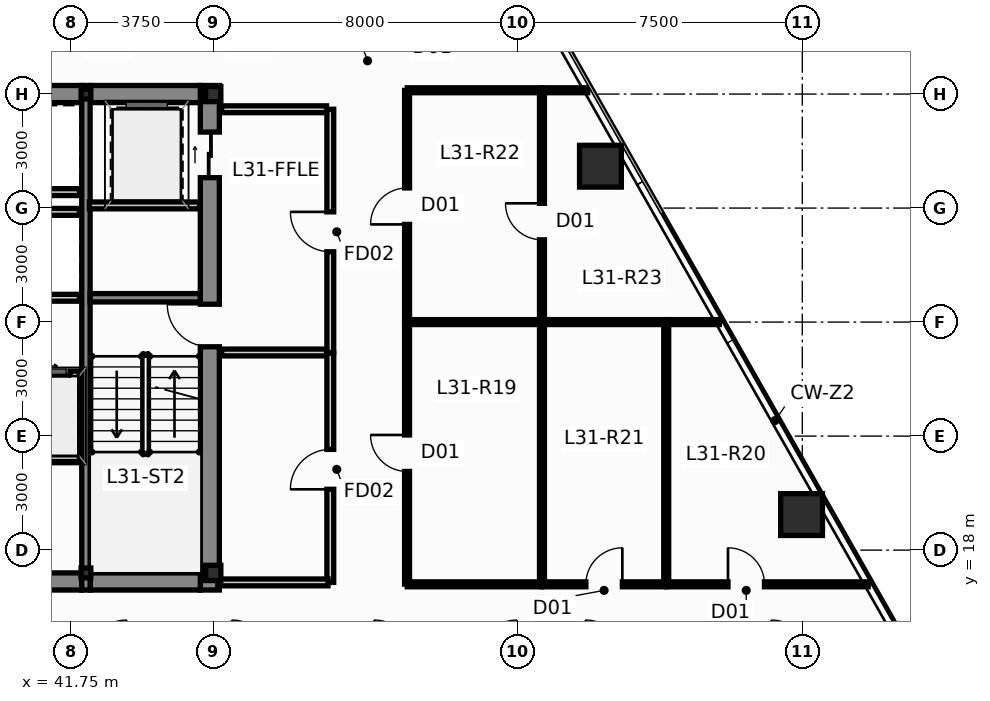
"""IFC4 building model, lengths in metres.
Left out: names, types, materials, properties, quantities, classifications, styles, units other than length and angle.
Written with IfcOpenShell. Run it as: python <this file> out.ifc"""

import sys

from ifc_helpers import new_model, si_unit, direction, frame, frame_2d, origin, origin_2d, place, context, subcontext, project, spatial, rectangle, hollow_rectangle, i_section, extrude, source, transform, mapped, element, fill, save


model = new_model("IFC4")
c1 = context("Model", 3, precision=1e-05, world=origin(), true_north=direction((0.0, 1.0)))
c2 = subcontext(c1, "Body", "Model", "MODEL_VIEW")
j1 = project(units=[si_unit("LENGTHUNIT", "METRE"), si_unit("PLANEANGLEUNIT", "RADIAN")], contexts=[c1])
p1 = place(None, origin())
s1 = spatial("IfcSite", under=j1, at=p1, CompositionType="ELEMENT")
p2 = place(p1, origin())
s2 = spatial("IfcBuilding", under=s1, at=p2, CompositionType="ELEMENT")
p3 = place(p2, frame((0.0, 0.0, 120.0)))
s3 = spatial("IfcBuildingStorey", under=s2, at=p3, CompositionType="ELEMENT", Elevation=120.0)
m1 = source(origin(), c2, "Body", "SweptSolid", [
    extrude(i_section(OverallWidth=0.4, OverallDepth=0.4, WebThickness=0.02, FlangeThickness=0.032, at=origin_2d()), origin(), (0.0, 0.0, 1.0), 3.65),
])
for number, where, z_axis, x_axis in (
    (1, (45.5, 17.4, 0.0), (0.0, 0.0, 1.0), (1.0, 0.0, 0.0)),
    (2, (45.5, 30.0, 0.0), (0.0, 0.0, 1.0), (1.0, 0.0, 0.0)),
):
    element("IfcColumn", number, at=place(p3, frame(where, z_axis=z_axis, x_axis=x_axis)), inside=s3, PredefinedType="COLUMN", context=c2, shape_type="MappedRepresentation", body=[
        mapped(m1, transform((0.0, 0.0, 0.0), scale=1.0)),
    ])
m2 = source(origin(), c2, "Body", "SweptSolid", [
    extrude(i_section(OverallWidth=0.256, OverallDepth=0.26, WebThickness=0.01, FlangeThickness=0.017, at=origin_2d()), origin(), (0.0, 0.0, 1.0), 3.65),
])
for number, where, z_axis, x_axis in (
    (3, (42.15, 17.4, 0.0), (0.0, 0.0, 1.0), (1.0, 0.0, 0.0)),
    (4, (42.15, 30.0, 0.0), (0.0, 0.0, 1.0), (1.0, 0.0, 0.0)),
):
    element("IfcColumn", number, at=place(p3, frame(where, z_axis=z_axis, x_axis=x_axis)), inside=s3, PredefinedType="COLUMN", context=c2, shape_type="MappedRepresentation", body=[
        mapped(m2, transform((0.0, 0.0, 0.0), scale=1.0)),
    ])
p4 = place(p3, frame((45.41, 16.95, 0.0), z_axis=(0.0, 0.0, 1.0), x_axis=(0.0, 1.0, 0.0)))
e5 = element("IfcWall", 5, at=p4, inside=s3, PredefinedType="SHEAR", context=c2, shape_type="SweptSolid", body=[
    extrude(rectangle(XDim=13.275, YDim=0.5, at=frame_2d((6.638, 0.0))), origin(), (0.0, 0.0, 1.0), 3.65),
])
p5 = place(p4, frame((6.4, 0.0, 0.0)))
e6 = element("IfcOpeningElement", 6, at=p5, cuts=e5, PredefinedType="OPENING", context=c2, shape_type="SweptSolid", body=[
    extrude(rectangle(XDim=1.12, YDim=2.15, at=frame_2d((0.56, 1.075))), frame((0.0, 0.262, 0.0), z_axis=(0.0, -1.0, 0.0), x_axis=(1.0, 0.0, 0.0)), (0.0, 0.0, 1.0), 0.524),
])
p6 = place(p4, frame((10.85, 0.0, 0.0)))
e7 = element("IfcOpeningElement", 7, at=p6, cuts=e5, PredefinedType="OPENING", context=c2, shape_type="SweptSolid", body=[
    extrude(rectangle(XDim=1.2, YDim=2.2, at=frame_2d((0.6, 1.1))), frame((0.0, 0.262, 0.0), z_axis=(0.0, -1.0, 0.0), x_axis=(1.0, 0.0, 0.0)), (0.0, 0.0, 1.0), 0.524),
])
p7 = place(p3, frame((33.96, 17.175, 0.0), z_axis=(0.0, 0.0, 1.0), x_axis=(1.0, 0.0, 0.0)))
e8 = element("IfcWall", 8, at=p7, inside=s3, PredefinedType="SHEAR", context=c2, shape_type="SweptSolid", body=[
    extrude(rectangle(XDim=8.08, YDim=0.45, at=frame_2d((4.04, 0.0))), origin(), (0.0, 0.0, 1.0), 3.65),
])
p8 = place(p3, frame((42.26, 17.175, 0.0), z_axis=(0.0, 0.0, 1.0), x_axis=(1.0, 0.0, 0.0)))
e9 = element("IfcWall", 9, at=p8, inside=s3, PredefinedType="SHEAR", context=c2, shape_type="SweptSolid", body=[
    extrude(rectangle(XDim=2.9, YDim=0.45, at=frame_2d((1.45, 0.0))), origin(), (0.0, 0.0, 1.0), 3.65),
])
p9 = place(p3, frame((40.16, 30.0, 0.0), z_axis=(0.0, 0.0, 1.0), x_axis=(1.0, 0.0, 0.0)))
e10 = element("IfcWall", 10, at=p9, inside=s3, PredefinedType="SHEAR", context=c2, shape_type="SweptSolid", body=[
    extrude(rectangle(XDim=1.88, YDim=0.45, at=frame_2d((0.94, 0.0))), origin(), (0.0, 0.0, 1.0), 3.65),
])
p10 = place(p3, frame((42.26, 30.0, 0.0), z_axis=(0.0, 0.0, 1.0), x_axis=(1.0, 0.0, 0.0)))
e11 = element("IfcWall", 11, at=p10, inside=s3, PredefinedType="SHEAR", context=c2, shape_type="SweptSolid", body=[
    extrude(rectangle(XDim=2.9, YDim=0.45, at=frame_2d((1.45, 0.0))), origin(), (0.0, 0.0, 1.0), 3.65),
])
p11 = place(p3, frame((42.15, 16.95, 0.0), z_axis=(0.0, 0.0, 1.0), x_axis=(0.0, 1.0, 0.0)))
e12 = element("IfcWall", 12, at=p11, inside=s3, PredefinedType="SHEAR", context=c2, shape_type="SweptSolid", body=[
    extrude(rectangle(XDim=13.275, YDim=0.22, at=frame_2d((6.638, 0.0))), origin(), (0.0, 0.0, 1.0), 3.65),
])
p12 = place(p3, frame((42.26, 24.64, 0.0), z_axis=(0.0, 0.0, 1.0), x_axis=(1.0, 0.0, 0.0)))
e13 = element("IfcWall", 13, at=p12, inside=s3, PredefinedType="SHEAR", context=c2, shape_type="SweptSolid", body=[
    extrude(rectangle(XDim=2.9, YDim=0.22, at=frame_2d((1.45, 0.0))), origin(), (0.0, 0.0, 1.0), 3.65),
])
m3 = source(origin(), c2, "Body", "SweptSolid", [
    extrude(hollow_rectangle(XDim=1.1, YDim=1.1, WallThickness=0.06, at=origin_2d()), origin(), (0.0, 0.0, 1.0), 3.651),
])
p13 = place(p3, frame((60.981, 18.935, 0.0), z_axis=(-0.010431780378, -0.021599135014, 0.999712286273), x_axis=(0.900476348161, -0.434904985489, 0.0)))
e14 = element("IfcColumn", 14, at=p13, inside=s3, PredefinedType="COLUMN", context=c2, shape_type="MappedRepresentation", body=[
    mapped(m3, transform((0.0, 0.0, 0.0), scale=1.0)),
])
m4 = source(origin(), c2, "Body", "SweptSolid", [
    extrude(hollow_rectangle(XDim=1.1, YDim=1.1, WallThickness=0.06, at=origin_2d()), origin(), (0.0, 0.0, 1.0), 3.651),
])
p14 = place(p3, frame((55.689, 28.102, 0.0), z_axis=(-0.014846438617, -0.013843300873, 0.999793951913), x_axis=(0.681966025159, -0.731383853069, 0.0)))
e15 = element("IfcColumn", 15, at=p14, inside=s3, PredefinedType="COLUMN", context=c2, shape_type="MappedRepresentation", body=[
    mapped(m4, transform((0.0, 0.0, 0.0), scale=1.0)),
])
p15 = place(p3, frame((40.28, 22.62, 0.0), z_axis=(0.0, 0.0, 1.0), x_axis=(1.0, 0.0, 0.0)))
e16 = element("IfcWall", 16, at=p15, inside=s3, PredefinedType="PARTITIONING", context=c2, shape_type="SweptSolid", body=[
    extrude(rectangle(XDim=1.7, YDim=0.18, at=frame_2d((0.85, 0.0))), origin(), (0.0, 0.0, 1.0), 3.4),
])
p16 = place(p15, frame((0.35, 0.0, 0.0)))
e17 = element("IfcOpeningElement", 17, at=p16, cuts=e16, PredefinedType="OPENING", context=c2, shape_type="SweptSolid", body=[
    extrude(rectangle(XDim=1.1, YDim=2.2, at=frame_2d((0.55, 1.1))), frame((0.0, 0.102, 0.0), z_axis=(0.0, -1.0, 0.0), x_axis=(1.0, 0.0, 0.0)), (0.0, 0.0, 1.0), 0.204),
])
p17 = place(p3, frame((40.28, 26.9, 0.0), z_axis=(0.0, 0.0, 1.0), x_axis=(1.0, 0.0, 0.0)))
e18 = element("IfcWall", 18, at=p17, inside=s3, PredefinedType="PARTITIONING", context=c2, shape_type="SweptSolid", body=[
    extrude(rectangle(XDim=1.7, YDim=0.18, at=frame_2d((0.85, 0.0))), origin(), (0.0, 0.0, 1.0), 3.4),
])
p18 = place(p3, frame((40.2, 24.64, 0.0), z_axis=(0.0, 0.0, 1.0), x_axis=(1.0, 0.0, 0.0)))
e19 = element("IfcWall", 19, at=p18, inside=s3, PredefinedType="PARTITIONING", context=c2, shape_type="SweptSolid", body=[
    extrude(rectangle(XDim=1.78, YDim=0.18, at=frame_2d((0.89, 0.0))), origin(), (0.0, 0.0, 1.0), 3.4),
])
p19 = place(p3, frame((40.22, 27.42, 0.0), z_axis=(0.0, 0.0, 1.0), x_axis=(1.0, 0.0, 0.0)))
e20 = element("IfcWall", 20, at=p19, inside=s3, PredefinedType="PARTITIONING", context=c2, shape_type="SweptSolid", body=[
    extrude(rectangle(XDim=1.76, YDim=0.18, at=frame_2d((0.88, 0.0))), origin(), (0.0, 0.0, 1.0), 3.4),
])
p20 = place(p3, frame((48.58, 23.2, 0.0), z_axis=(0.0, 0.0, 1.0), x_axis=(0.0, 1.0, 0.0)))
e21 = element("IfcWall", 21, at=p20, inside=s3, PredefinedType="PARTITIONING", context=c2, shape_type="SweptSolid", body=[
    extrude(rectangle(XDim=6.4, YDim=0.18, at=frame_2d((3.2, 0.0))), origin(), (0.0, 0.0, 1.0), 3.026),
])
p21 = place(p20, frame((2.65, 0.0, 0.0)))
e22 = element("IfcOpeningElement", 22, at=p21, cuts=e21, PredefinedType="OPENING", context=c2, shape_type="SweptSolid", body=[
    extrude(rectangle(XDim=1.05, YDim=2.15, at=frame_2d((0.525, 1.075))), frame((0.0, 0.102, 0.0), z_axis=(0.0, -1.0, 0.0), x_axis=(1.0, 0.0, 0.0)), (0.0, 0.0, 1.0), 0.204),
])
p22 = place(p3, frame((45.72, 23.2, 0.0), z_axis=(0.0, 0.0, 1.0), x_axis=(1.0, 0.0, 0.0)))
e23 = element("IfcWall", 23, at=p22, inside=s3, PredefinedType="PARTITIONING", context=c2, shape_type="SweptSolid", body=[
    extrude(rectangle(XDim=2.76, YDim=0.18, at=frame_2d((1.38, 0.0))), origin(), (0.0, 0.0, 1.0), 3.4),
])
p23 = place(p3, frame((45.72, 29.6, 0.0), z_axis=(0.0, 0.0, 1.0), x_axis=(1.0, 0.0, 0.0)))
e24 = element("IfcWall", 24, at=p23, inside=s3, PredefinedType="PARTITIONING", context=c2, shape_type="SweptSolid", body=[
    extrude(rectangle(XDim=2.76, YDim=0.18, at=frame_2d((1.38, 0.0))), origin(), (0.0, 0.0, 1.0), 2.783),
])
p24 = place(p3, frame((42.24, 27.07, 0.0), z_axis=(0.0, 0.0, 1.0), x_axis=(1.0, 0.0, 0.0)))
e25 = element("IfcWall", 25, at=p24, inside=s3, PredefinedType="PARTITIONING", context=c2, shape_type="SweptSolid", body=[
    extrude(rectangle(XDim=2.9, YDim=0.18, at=frame_2d((1.45, 0.0))), origin(), (0.0, 0.0, 1.0), 3.4),
])
p25 = place(p3, frame((40.22, 20.42, 0.0), z_axis=(0.0, 0.0, 1.0), x_axis=(1.0, 0.0, 0.0)))
e26 = element("IfcWall", 26, at=p25, inside=s3, PredefinedType="PARTITIONING", context=c2, shape_type="SweptSolid", body=[
    extrude(rectangle(XDim=1.76, YDim=0.18, at=frame_2d((0.88, 0.0))), origin(), (0.0, 0.0, 1.0), 3.4),
])
p26 = place(p3, frame((48.58, 17.15, 0.0), z_axis=(0.0, 0.0, 1.0), x_axis=(0.0, 1.0, 0.0)))
e27 = element("IfcWall", 27, at=p26, inside=s3, PredefinedType="PARTITIONING", context=c2, shape_type="SweptSolid", body=[
    extrude(rectangle(XDim=6.03, YDim=0.18, at=frame_2d((3.015, 0.0))), origin(), (0.0, 0.0, 1.0), 3.4),
])
p27 = place(p26, frame((2.45, 0.0, 0.0)))
e28 = element("IfcOpeningElement", 28, at=p27, cuts=e27, PredefinedType="OPENING", context=c2, shape_type="SweptSolid", body=[
    extrude(rectangle(XDim=1.05, YDim=2.15, at=frame_2d((0.525, 1.075))), frame((0.0, 0.102, 0.0), z_axis=(0.0, -1.0, 0.0), x_axis=(1.0, 0.0, 0.0)), (0.0, 0.0, 1.0), 0.204),
])
p28 = place(p3, frame((45.62, 17.15, 0.0), z_axis=(0.0, 0.0, 1.0), x_axis=(1.0, 0.0, 0.0)))
e29 = element("IfcWall", 29, at=p28, inside=s3, PredefinedType="PARTITIONING", context=c2, shape_type="SweptSolid", body=[
    extrude(rectangle(XDim=2.9, YDim=0.18, at=frame_2d((1.45, 0.0))), origin(), (0.0, 0.0, 1.0), 2.783),
])
p29 = place(p3, frame((50.6, 17.105, 0.0), z_axis=(0.0, 0.0, 1.0), x_axis=(0.0, 1.0, 0.0)))
e30 = element("IfcWall", 30, at=p29, inside=s3, PredefinedType="PARTITIONING", context=c2, shape_type="SweptSolid", body=[
    extrude(rectangle(XDim=6.89, YDim=0.13, at=frame_2d((3.445, 0.0))), origin(), (0.0, 0.0, 1.0), 3.026),
])
p30 = place(p29, frame((2.965, 0.0, 0.0)))
e31 = element("IfcOpeningElement", 31, at=p30, cuts=e30, PredefinedType="OPENING", context=c2, shape_type="SweptSolid", body=[
    extrude(rectangle(XDim=0.96, YDim=2.15, at=frame_2d((0.48, 1.075))), frame((0.0, 0.077, 0.0), z_axis=(0.0, -1.0, 0.0), x_axis=(1.0, 0.0, 0.0)), (0.0, 0.0, 1.0), 0.154),
])
p31 = place(p3, frame((54.15, 17.105, 0.0), z_axis=(0.0, 0.0, 1.0), x_axis=(0.0, 1.0, 0.0)))
e32 = element("IfcWall", 32, at=p31, inside=s3, PredefinedType="PARTITIONING", context=c2, shape_type="SweptSolid", body=[
    extrude(rectangle(XDim=6.89, YDim=0.13, at=frame_2d((3.445, 0.0))), origin(), (0.0, 0.0, 1.0), 3.026),
])
p32 = place(p3, frame((57.42, 17.105, 0.0), z_axis=(0.0, 0.0, 1.0), x_axis=(0.0, 1.0, 0.0)))
e33 = element("IfcWall", 33, at=p32, inside=s3, PredefinedType="PARTITIONING", context=c2, shape_type="SweptSolid", body=[
    extrude(rectangle(XDim=6.89, YDim=0.13, at=frame_2d((3.445, 0.0))), origin(), (0.0, 0.0, 1.0), 3.4),
])
p33 = place(p3, frame((50.6, 24.005, 0.0), z_axis=(0.0, 0.0, 1.0), x_axis=(0.0, 1.0, 0.0)))
e34 = element("IfcWall", 34, at=p33, inside=s3, PredefinedType="PARTITIONING", context=c2, shape_type="SweptSolid", body=[
    extrude(rectangle(XDim=6.09, YDim=0.13, at=frame_2d((3.045, 0.0))), origin(), (0.0, 0.0, 1.0), 3.026),
])
p34 = place(p33, frame((2.565, 0.0, 0.0)))
e35 = element("IfcOpeningElement", 35, at=p34, cuts=e34, PredefinedType="OPENING", context=c2, shape_type="SweptSolid", body=[
    extrude(rectangle(XDim=0.96, YDim=2.15, at=frame_2d((0.48, 1.075))), frame((0.0, 0.077, 0.0), z_axis=(0.0, -1.0, 0.0), x_axis=(1.0, 0.0, 0.0)), (0.0, 0.0, 1.0), 0.154),
])
p35 = place(p3, frame((54.15, 24.005, 0.0), z_axis=(0.0, 0.0, 1.0), x_axis=(0.0, 1.0, 0.0)))
e36 = element("IfcWall", 36, at=p35, inside=s3, PredefinedType="PARTITIONING", context=c2, shape_type="SweptSolid", body=[
    extrude(rectangle(XDim=6.09, YDim=0.13, at=frame_2d((3.045, 0.0))), origin(), (0.0, 0.0, 1.0), 3.026),
])
p36 = place(p35, frame((2.16, 0.0, 0.0)))
e37 = element("IfcOpeningElement", 37, at=p36, cuts=e36, PredefinedType="OPENING", context=c2, shape_type="SweptSolid", body=[
    extrude(rectangle(XDim=0.96, YDim=2.15, at=frame_2d((0.48, 1.075))), frame((0.0, 0.077, 0.0), z_axis=(0.0, -1.0, 0.0), x_axis=(1.0, 0.0, 0.0)), (0.0, 0.0, 1.0), 0.154),
])
p37 = place(p3, frame((57.425, 17.1, 0.0), z_axis=(0.0, 0.0, 1.0), x_axis=(1.0, 0.0, 0.0)))
e38 = element("IfcWall", 38, at=p37, inside=s3, PredefinedType="PARTITIONING", context=c2, shape_type="SweptSolid", body=[
    extrude(rectangle(XDim=5.309, YDim=0.13, at=frame_2d((2.654, 0.0))), origin(), (0.0, 0.0, 1.0), 3.4),
])
p38 = place(p37, frame((1.62, 0.0, 0.0)))
e39 = element("IfcOpeningElement", 39, at=p38, cuts=e38, PredefinedType="OPENING", context=c2, shape_type="SweptSolid", body=[
    extrude(rectangle(XDim=0.96, YDim=2.15, at=frame_2d((0.48, 1.075))), frame((0.0, 0.077, 0.0), z_axis=(0.0, -1.0, 0.0), x_axis=(1.0, 0.0, 0.0)), (0.0, 0.0, 1.0), 0.154),
])
for number, where, z_axis, x_axis in (
    (40, (50.605, 30.1, 0.0), (0.0, 0.0, 1.0), (1.0, 0.0, 0.0)),
    (41, (54.145, 17.1, 0.0), (0.0, 0.0, 1.0), (-1.0, 0.0, 0.0)),
    (42, (50.605, 24.0, 0.0), (0.0, 0.0, 1.0), (1.0, 0.0, 0.0)),
):
    element("IfcWall", number, at=place(p3, frame(where, z_axis=z_axis, x_axis=x_axis)), inside=s3, PredefinedType="PARTITIONING", context=c2, shape_type="SweptSolid", body=[
        extrude(rectangle(XDim=3.54, YDim=0.13, at=frame_2d((1.77, 0.0))), origin(), (0.0, 0.0, 1.0), 3.4),
    ])
p39 = place(p3, frame((54.155, 17.1, 0.0), z_axis=(0.0, 0.0, 1.0), x_axis=(1.0, 0.0, 0.0)))
e43 = element("IfcWall", 43, at=p39, inside=s3, PredefinedType="PARTITIONING", context=c2, shape_type="SweptSolid", body=[
    extrude(rectangle(XDim=3.26, YDim=0.13, at=frame_2d((1.63, 0.0))), origin(), (0.0, 0.0, 1.0), 3.4),
])
p40 = place(p39, frame((1.15, 0.0, 0.0)))
e44 = element("IfcOpeningElement", 44, at=p40, cuts=e43, PredefinedType="OPENING", context=c2, shape_type="SweptSolid", body=[
    extrude(rectangle(XDim=0.96, YDim=2.15, at=frame_2d((0.48, 1.075))), frame((0.0, 0.077, 0.0), z_axis=(0.0, -1.0, 0.0), x_axis=(1.0, 0.0, 0.0)), (0.0, 0.0, 1.0), 0.154),
])
p41 = place(p3, frame((54.155, 24.0, 0.0), z_axis=(0.0, 0.0, 1.0), x_axis=(1.0, 0.0, 0.0)))
e45 = element("IfcWall", 45, at=p41, inside=s3, PredefinedType="PARTITIONING", context=c2, shape_type="SweptSolid", body=[
    extrude(rectangle(XDim=3.26, YDim=0.13, at=frame_2d((1.63, 0.0))), origin(), (0.0, 0.0, 1.0), 3.4),
])
p42 = place(p3, frame((57.425, 24.0, 0.0), z_axis=(0.0, 0.0, 1.0), x_axis=(1.0, 0.0, 0.0)))
e46 = element("IfcWall", 46, at=p42, inside=s3, PredefinedType="PARTITIONING", context=c2, shape_type="SweptSolid", body=[
    extrude(rectangle(XDim=1.391, YDim=0.13, at=frame_2d((0.696, 0.0))), origin(), (0.0, 0.0, 1.0), 3.4),
])
p43 = place(p3, frame((54.155, 30.1, 0.0), z_axis=(0.0, 0.0, 1.0), x_axis=(1.0, 0.0, 0.0)))
e47 = element("IfcWall", 47, at=p43, inside=s3, PredefinedType="PARTITIONING", context=c2, shape_type="SweptSolid", body=[
    extrude(rectangle(XDim=1.198, YDim=0.13, at=frame_2d((0.599, 0.0))), origin(), (0.0, 0.0, 1.0), 3.4),
])
p44 = place(p5, origin())
e48 = element("IfcDoor", 48, at=p44, inside=s3, OperationType="SINGLE_SWING_RIGHT", PredefinedType="DOOR", context=c2, shape_type="SweptSolid", body=[
    extrude(rectangle(XDim=1.12, YDim=2.15, at=frame_2d((0.56, 1.075))), frame((0.0, 0.025, 0.0), z_axis=(0.0, -1.0, 0.0), x_axis=(1.0, 0.0, 0.0)), (0.0, 0.0, 1.0), 0.05),
])
fill(e6, e48)
p45 = place(p6, origin())
e49 = element("IfcDoor", 49, at=p45, inside=s3, OperationType="SLIDING_TO_RIGHT", PredefinedType="DOOR", context=c2, shape_type="SweptSolid", body=[
    extrude(rectangle(XDim=1.2, YDim=2.2, at=frame_2d((0.6, 1.1))), frame((0.0, 0.025, 0.0), z_axis=(0.0, -1.0, 0.0), x_axis=(1.0, 0.0, 0.0)), (0.0, 0.0, 1.0), 0.05),
])
fill(e7, e49)
p46 = place(p16, origin())
e50 = element("IfcDoor", 50, at=p46, inside=s3, OperationType="SLIDING_TO_LEFT", PredefinedType="DOOR", context=c2, shape_type="SweptSolid", body=[
    extrude(rectangle(XDim=1.1, YDim=2.2, at=frame_2d((0.55, 1.1))), frame((0.0, 0.025, 0.0), z_axis=(0.0, -1.0, 0.0), x_axis=(1.0, 0.0, 0.0)), (0.0, 0.0, 1.0), 0.05),
])
fill(e17, e50)
p47 = place(p21, origin())
e51 = element("IfcDoor", 51, at=p47, inside=s3, OperationType="SINGLE_SWING_RIGHT", PredefinedType="DOOR", context=c2, shape_type="SweptSolid", body=[
    extrude(rectangle(XDim=1.05, YDim=2.15, at=frame_2d((0.525, 1.075))), frame((0.0, 0.025, 0.0), z_axis=(0.0, -1.0, 0.0), x_axis=(1.0, 0.0, 0.0)), (0.0, 0.0, 1.0), 0.05),
])
fill(e22, e51)
p48 = place(p27, origin())
e52 = element("IfcDoor", 52, at=p48, inside=s3, OperationType="SINGLE_SWING_LEFT", PredefinedType="DOOR", context=c2, shape_type="SweptSolid", body=[
    extrude(rectangle(XDim=1.05, YDim=2.15, at=frame_2d((0.525, 1.075))), frame((0.0, 0.025, 0.0), z_axis=(0.0, -1.0, 0.0), x_axis=(1.0, 0.0, 0.0)), (0.0, 0.0, 1.0), 0.05),
])
fill(e28, e52)
p49 = place(p30, origin())
e53 = element("IfcDoor", 53, at=p49, inside=s3, OperationType="SINGLE_SWING_RIGHT", PredefinedType="DOOR", context=c2, shape_type="SweptSolid", body=[
    extrude(rectangle(XDim=0.96, YDim=2.15, at=frame_2d((0.48, 1.075))), frame((0.0, 0.025, 0.0), z_axis=(0.0, -1.0, 0.0), x_axis=(1.0, 0.0, 0.0)), (0.0, 0.0, 1.0), 0.05),
])
fill(e31, e53)
p50 = place(p34, origin())
e54 = element("IfcDoor", 54, at=p50, inside=s3, OperationType="SINGLE_SWING_LEFT", PredefinedType="DOOR", context=c2, shape_type="SweptSolid", body=[
    extrude(rectangle(XDim=0.96, YDim=2.15, at=frame_2d((0.48, 1.075))), frame((0.0, 0.025, 0.0), z_axis=(0.0, -1.0, 0.0), x_axis=(1.0, 0.0, 0.0)), (0.0, 0.0, 1.0), 0.05),
])
fill(e35, e54)
p51 = place(p36, origin())
e55 = element("IfcDoor", 55, at=p51, inside=s3, OperationType="SINGLE_SWING_RIGHT", PredefinedType="DOOR", context=c2, shape_type="SweptSolid", body=[
    extrude(rectangle(XDim=0.96, YDim=2.15, at=frame_2d((0.48, 1.075))), frame((0.0, 0.025, 0.0), z_axis=(0.0, -1.0, 0.0), x_axis=(1.0, 0.0, 0.0)), (0.0, 0.0, 1.0), 0.05),
])
fill(e37, e55)
p52 = place(p38, origin())
e56 = element("IfcDoor", 56, at=p52, inside=s3, OperationType="SINGLE_SWING_LEFT", PredefinedType="DOOR", context=c2, shape_type="SweptSolid", body=[
    extrude(rectangle(XDim=0.96, YDim=2.15, at=frame_2d((0.48, 1.075))), frame((0.0, 0.025, 0.0), z_axis=(0.0, -1.0, 0.0), x_axis=(1.0, 0.0, 0.0)), (0.0, 0.0, 1.0), 0.05),
])
fill(e39, e56)
p53 = place(p40, origin())
e57 = element("IfcDoor", 57, at=p53, inside=s3, OperationType="SINGLE_SWING_RIGHT", PredefinedType="DOOR", context=c2, shape_type="SweptSolid", body=[
    extrude(rectangle(XDim=0.96, YDim=2.15, at=frame_2d((0.48, 1.075))), frame((0.0, 0.025, 0.0), z_axis=(0.0, -1.0, 0.0), x_axis=(1.0, 0.0, 0.0)), (0.0, 0.0, 1.0), 0.05),
])
fill(e44, e57)
save(model, sys.argv[1])
